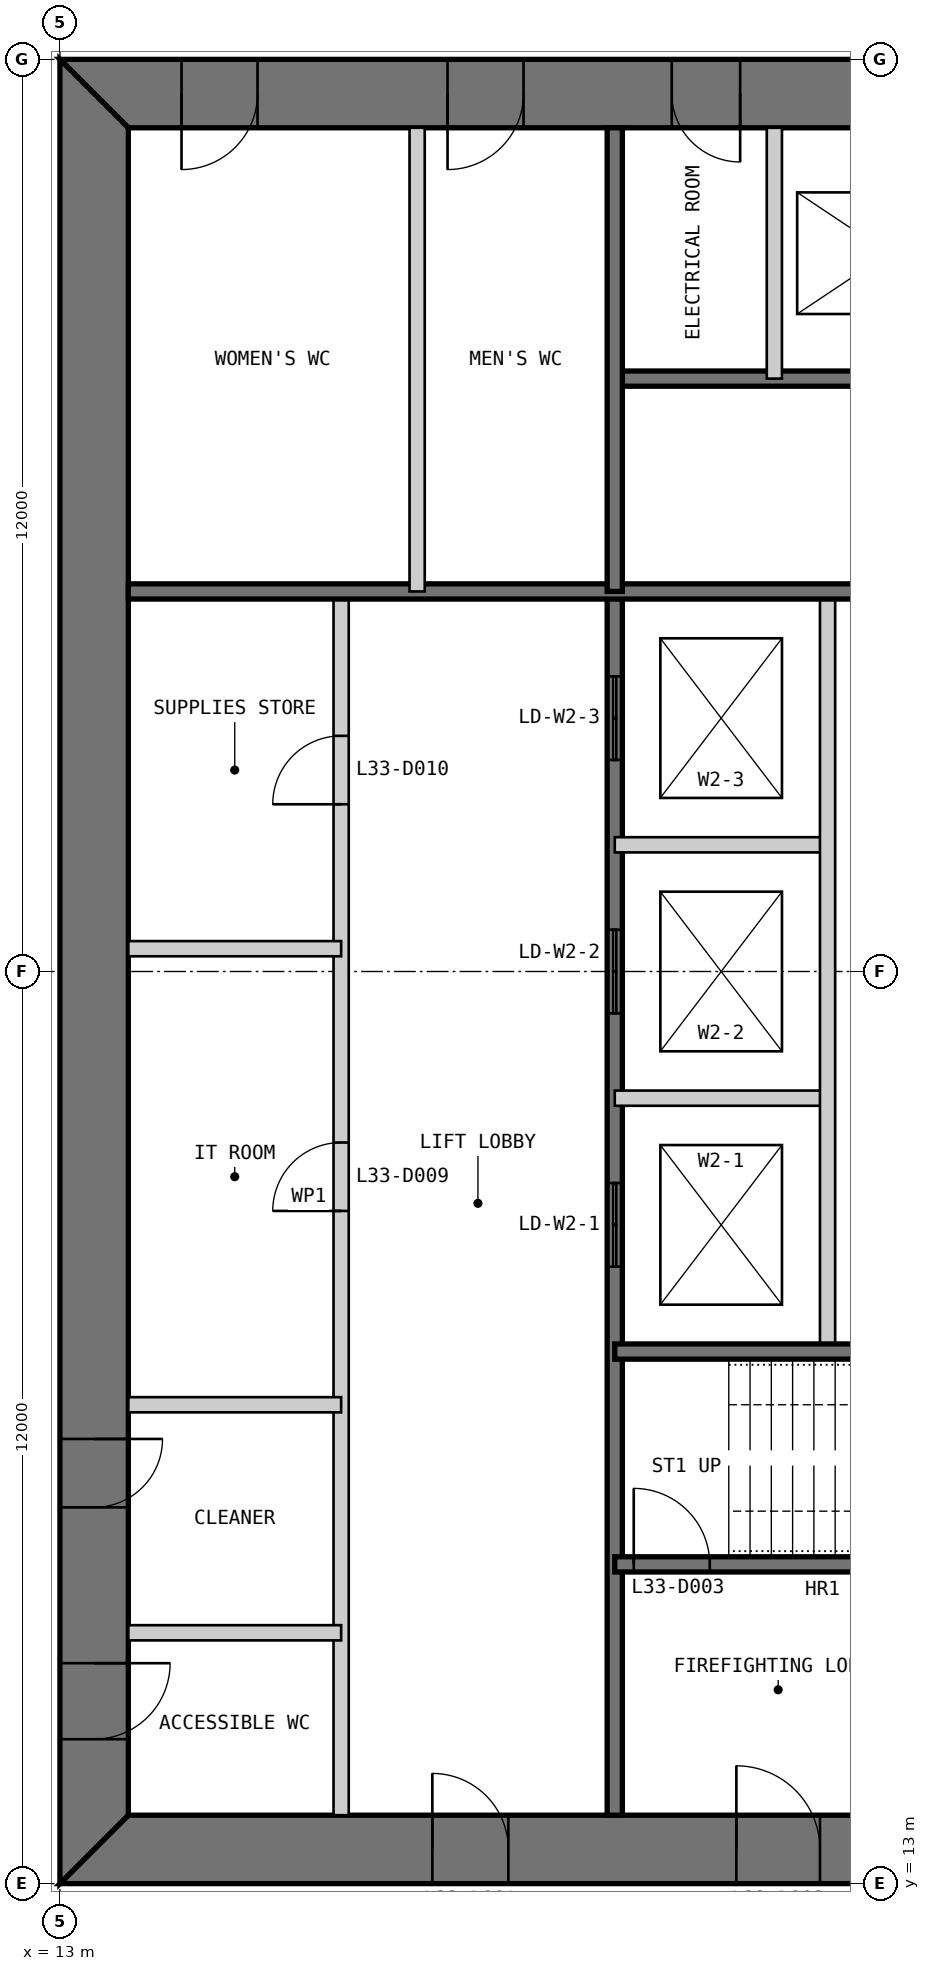
"""IFC4 building model, lengths in metres.
Left out: names, types, materials, properties, quantities, classifications, styles, units other than length and angle.
Written with IfcOpenShell. Run it as: python <this file> out.ifc"""

import sys

from ifc_helpers import new_model, si_unit, direction, frame, frame_2d, origin, place, context, subcontext, project, spatial, polyline, rectangle, outline, extrude, element, fill, save


model = new_model("IFC4")
c1 = context("Model", 3, precision=1e-05, world=origin(), true_north=direction((0.0, 1.0)))
c2 = subcontext(c1, "Body", "Model", "MODEL_VIEW")
j1 = project(units=[si_unit("LENGTHUNIT", "METRE"), si_unit("PLANEANGLEUNIT", "RADIAN")], contexts=[c1])
p1 = place(None, origin())
s1 = spatial("IfcSite", under=j1, at=p1, CompositionType="ELEMENT")
p2 = place(p1, origin())
s2 = spatial("IfcBuilding", under=s1, at=p2, CompositionType="ELEMENT")
p3 = place(p2, frame((0.0, 0.0, 142.4)))
s3 = spatial("IfcBuildingStorey", under=s2, at=p3, CompositionType="ELEMENT", Elevation=142.4)
p4 = place(p3, frame((13.0, 13.45, 0.0), z_axis=(0.0, 0.0, 1.0), x_axis=(1.0, 0.0, 0.0)))
e1 = element("IfcWall", 1, at=p4, inside=s3, PredefinedType="SHEAR", context=c2, shape_type="SweptSolid", body=[
    extrude(outline(polyline([(0.0, -0.45), (24.0, -0.45), (23.1, 0.45), (0.9, 0.45), (0.0, -0.45)])), origin(), (0.0, 0.0, 1.0), 4.0),
])
p5 = place(p4, frame((4.9, 0.0, 0.0)))
e2 = element("IfcOpeningElement", 2, at=p5, cuts=e1, PredefinedType="OPENING", context=c2, shape_type="SweptSolid", body=[
    extrude(rectangle(XDim=1.0, YDim=2.2, at=frame_2d((0.5, 1.1))), frame((0.0, 0.46, 0.0), z_axis=(0.0, -1.0, 0.0), x_axis=(1.0, 0.0, 0.0)), (0.0, 0.0, 1.0), 0.92),
])
p6 = place(p4, frame((8.9, 0.0, 0.0)))
e3 = element("IfcOpeningElement", 3, at=p6, cuts=e1, PredefinedType="OPENING", context=c2, shape_type="SweptSolid", body=[
    extrude(rectangle(XDim=1.1, YDim=2.2, at=frame_2d((0.55, 1.1))), frame((0.0, 0.46, 0.0), z_axis=(0.0, -1.0, 0.0), x_axis=(1.0, 0.0, 0.0)), (0.0, 0.0, 1.0), 0.92),
])
p7 = place(p4, frame((15.05, 0.0, 0.0)))
e4 = element("IfcOpeningElement", 4, at=p7, cuts=e1, PredefinedType="OPENING", context=c2, shape_type="SweptSolid", body=[
    extrude(rectangle(XDim=0.9, YDim=2.2, at=frame_2d((0.45, 1.1))), frame((0.0, 0.46, 0.0), z_axis=(0.0, -1.0, 0.0), x_axis=(1.0, 0.0, 0.0)), (0.0, 0.0, 1.0), 0.92),
])
p8 = place(p4, frame((17.9, 0.0, 0.0)))
e5 = element("IfcOpeningElement", 5, at=p8, cuts=e1, PredefinedType="OPENING", context=c2, shape_type="SweptSolid", body=[
    extrude(rectangle(XDim=1.0, YDim=2.2, at=frame_2d((0.5, 1.1))), frame((0.0, 0.46, 0.0), z_axis=(0.0, -1.0, 0.0), x_axis=(1.0, 0.0, 0.0)), (0.0, 0.0, 1.0), 0.92),
])
p9 = place(p4, frame((21.4, 0.0, 0.0)))
e6 = element("IfcOpeningElement", 6, at=p9, cuts=e1, PredefinedType="OPENING", context=c2, shape_type="SweptSolid", body=[
    extrude(rectangle(XDim=1.0, YDim=2.2, at=frame_2d((0.5, 1.1))), frame((0.0, 0.46, 0.0), z_axis=(0.0, -1.0, 0.0), x_axis=(1.0, 0.0, 0.0)), (0.0, 0.0, 1.0), 0.92),
])
p10 = place(p3, frame((37.0, 36.55, 0.0), z_axis=(0.0, 0.0, 1.0), x_axis=(-1.0, 0.0, 0.0)))
e7 = element("IfcWall", 7, at=p10, inside=s3, PredefinedType="SHEAR", context=c2, shape_type="SweptSolid", body=[
    extrude(outline(polyline([(0.0, -0.45), (24.0, -0.45), (23.1, 0.45), (0.9, 0.45), (0.0, -0.45)])), origin(), (0.0, 0.0, 1.0), 4.0),
])
p11 = place(p10, frame((4.9, 0.0, 0.0)))
e8 = element("IfcOpeningElement", 8, at=p11, cuts=e7, PredefinedType="OPENING", context=c2, shape_type="SweptSolid", body=[
    extrude(rectangle(XDim=1.0, YDim=2.2, at=frame_2d((0.5, 1.1))), frame((0.0, 0.46, 0.0), z_axis=(0.0, -1.0, 0.0), x_axis=(1.0, 0.0, 0.0)), (0.0, 0.0, 1.0), 0.92),
])
p12 = place(p10, frame((8.9, 0.0, 0.0)))
e9 = element("IfcOpeningElement", 9, at=p12, cuts=e7, PredefinedType="OPENING", context=c2, shape_type="SweptSolid", body=[
    extrude(rectangle(XDim=1.1, YDim=2.2, at=frame_2d((0.55, 1.1))), frame((0.0, 0.46, 0.0), z_axis=(0.0, -1.0, 0.0), x_axis=(1.0, 0.0, 0.0)), (0.0, 0.0, 1.0), 0.92),
])
p13 = place(p10, frame((15.05, 0.0, 0.0)))
e10 = element("IfcOpeningElement", 10, at=p13, cuts=e7, PredefinedType="OPENING", context=c2, shape_type="SweptSolid", body=[
    extrude(rectangle(XDim=0.9, YDim=2.2, at=frame_2d((0.45, 1.1))), frame((0.0, 0.46, 0.0), z_axis=(0.0, -1.0, 0.0), x_axis=(1.0, 0.0, 0.0)), (0.0, 0.0, 1.0), 0.92),
])
p14 = place(p10, frame((17.9, 0.0, 0.0)))
e11 = element("IfcOpeningElement", 11, at=p14, cuts=e7, PredefinedType="OPENING", context=c2, shape_type="SweptSolid", body=[
    extrude(rectangle(XDim=1.0, YDim=2.2, at=frame_2d((0.5, 1.1))), frame((0.0, 0.46, 0.0), z_axis=(0.0, -1.0, 0.0), x_axis=(1.0, 0.0, 0.0)), (0.0, 0.0, 1.0), 0.92),
])
p15 = place(p10, frame((21.4, 0.0, 0.0)))
e12 = element("IfcOpeningElement", 12, at=p15, cuts=e7, PredefinedType="OPENING", context=c2, shape_type="SweptSolid", body=[
    extrude(rectangle(XDim=1.0, YDim=2.2, at=frame_2d((0.5, 1.1))), frame((0.0, 0.46, 0.0), z_axis=(0.0, -1.0, 0.0), x_axis=(1.0, 0.0, 0.0)), (0.0, 0.0, 1.0), 0.92),
])
p16 = place(p3, frame((13.45, 36.1, 0.0), z_axis=(0.0, 0.0, 1.0), x_axis=(0.0, -1.0, 0.0)))
e13 = element("IfcWall", 13, at=p16, inside=s3, PredefinedType="SHEAR", context=c2, shape_type="SweptSolid", body=[
    extrude(outline(polyline([(-0.9, -0.45), (23.1, -0.45), (22.2, 0.45), (0.0, 0.45), (-0.9, -0.45)])), origin(), (0.0, 0.0, 1.0), 4.0),
])
p17 = place(p16, frame((20.2, 0.0, 0.0)))
e14 = element("IfcOpeningElement", 14, at=p17, cuts=e13, PredefinedType="OPENING", context=c2, shape_type="SweptSolid", body=[
    extrude(rectangle(XDim=1.0, YDim=2.2, at=frame_2d((0.5, 1.1))), frame((0.0, 0.46, 0.0), z_axis=(0.0, -1.0, 0.0), x_axis=(1.0, 0.0, 0.0)), (0.0, 0.0, 1.0), 0.92),
])
p18 = place(p16, frame((17.25, 0.0, 0.0)))
e15 = element("IfcOpeningElement", 15, at=p18, cuts=e13, PredefinedType="OPENING", context=c2, shape_type="SweptSolid", body=[
    extrude(rectangle(XDim=0.9, YDim=2.2, at=frame_2d((0.45, 1.1))), frame((0.0, 0.46, 0.0), z_axis=(0.0, -1.0, 0.0), x_axis=(1.0, 0.0, 0.0)), (0.0, 0.0, 1.0), 0.92),
])
p19 = place(p3, frame((16.7, 13.9, 0.0), z_axis=(0.0, 0.0, 1.0), x_axis=(0.0, 1.0, 0.0)))
e16 = element("IfcWall", 16, at=p19, inside=s3, PredefinedType="PARTITIONING", context=c2, shape_type="SweptSolid", body=[
    extrude(rectangle(XDim=16.1, YDim=0.2, at=frame_2d((8.05, 0.0))), origin(), (0.0, 0.0, 1.0), 3.8),
])
p20 = place(p19, frame((7.95, 0.0, 0.0)))
e17 = element("IfcOpeningElement", 17, at=p20, cuts=e16, PredefinedType="OPENING", context=c2, shape_type="SweptSolid", body=[
    extrude(rectangle(XDim=0.9, YDim=2.2, at=frame_2d((0.45, 1.1))), frame((0.0, 0.11, 0.0), z_axis=(0.0, -1.0, 0.0), x_axis=(1.0, 0.0, 0.0)), (0.0, 0.0, 1.0), 0.22),
])
p21 = place(p19, frame((13.3, 0.0, 0.0)))
e18 = element("IfcOpeningElement", 18, at=p21, cuts=e16, PredefinedType="OPENING", context=c2, shape_type="SweptSolid", body=[
    extrude(rectangle(XDim=0.9, YDim=2.2, at=frame_2d((0.45, 1.1))), frame((0.0, 0.11, 0.0), z_axis=(0.0, -1.0, 0.0), x_axis=(1.0, 0.0, 0.0)), (0.0, 0.0, 1.0), 0.22),
])
p22 = place(p3, frame((20.3, 13.9, 0.0), z_axis=(0.0, 0.0, 1.0), x_axis=(0.0, 1.0, 0.0)))
e19 = element("IfcWall", 19, at=p22, inside=s3, PredefinedType="SOLIDWALL", context=c2, shape_type="SweptSolid", body=[
    extrude(rectangle(XDim=16.1, YDim=0.2, at=frame_2d((8.05, 0.0))), origin(), (0.0, 0.0, 1.0), 3.8),
])
p23 = place(p22, frame((7.217, 0.0, 0.0)))
e20 = element("IfcOpeningElement", 20, at=p23, cuts=e19, PredefinedType="OPENING", context=c2, shape_type="SweptSolid", body=[
    extrude(rectangle(XDim=1.1, YDim=2.2, at=frame_2d((0.55, 1.1))), frame((0.0, 0.11, 0.0), z_axis=(0.0, -1.0, 0.0), x_axis=(1.0, 0.0, 0.0)), (0.0, 0.0, 1.0), 0.22),
])
p24 = place(p22, frame((10.55, 0.0, 0.0)))
e21 = element("IfcOpeningElement", 21, at=p24, cuts=e19, PredefinedType="OPENING", context=c2, shape_type="SweptSolid", body=[
    extrude(rectangle(XDim=1.1, YDim=2.2, at=frame_2d((0.55, 1.1))), frame((0.0, 0.11, 0.0), z_axis=(0.0, -1.0, 0.0), x_axis=(1.0, 0.0, 0.0)), (0.0, 0.0, 1.0), 0.22),
])
p25 = place(p22, frame((13.883, 0.0, 0.0)))
e22 = element("IfcOpeningElement", 22, at=p25, cuts=e19, PredefinedType="OPENING", context=c2, shape_type="SweptSolid", body=[
    extrude(rectangle(XDim=1.1, YDim=2.2, at=frame_2d((0.55, 1.1))), frame((0.0, 0.11, 0.0), z_axis=(0.0, -1.0, 0.0), x_axis=(1.0, 0.0, 0.0)), (0.0, 0.0, 1.0), 0.22),
])
for number, where, z_axis, x_axis in (
    (23, (20.3, 23.333, 0.0), (0.0, 0.0, 1.0), (1.0, 0.0, 0.0)),
    (24, (20.3, 26.667, 0.0), (0.0, 0.0, 1.0), (1.0, 0.0, 0.0)),
):
    element("IfcWall", number, at=place(p3, frame(where, z_axis=z_axis, x_axis=x_axis)), inside=s3, PredefinedType="PARTITIONING", context=c2, shape_type="SweptSolid", body=[
        extrude(rectangle(XDim=2.8, YDim=0.2, at=frame_2d((1.4, 0.0))), origin(), (0.0, 0.0, 1.0), 3.8),
    ])
p26 = place(p3, frame((23.1, 20.0, 0.0), z_axis=(0.0, 0.0, 1.0), x_axis=(0.0, 1.0, 0.0)))
e25 = element("IfcWall", 25, at=p26, inside=s3, PredefinedType="PARTITIONING", context=c2, shape_type="SweptSolid", body=[
    extrude(rectangle(XDim=10.0, YDim=0.2, at=frame_2d((5.0, 0.0))), origin(), (0.0, 0.0, 1.0), 3.8),
])
p27 = place(p3, frame((20.3, 17.2, 0.0), z_axis=(0.0, 0.0, 1.0), x_axis=(1.0, 0.0, 0.0)))
e26 = element("IfcWall", 26, at=p27, inside=s3, PredefinedType="SOLIDWALL", context=c2, shape_type="SweptSolid", body=[
    extrude(rectangle(XDim=9.4, YDim=0.2, at=frame_2d((4.7, 0.0))), origin(), (0.0, 0.0, 1.0), 3.8),
])
p28 = place(p27, frame((0.25, 0.0, 0.0)))
e27 = element("IfcOpeningElement", 27, at=p28, cuts=e26, PredefinedType="OPENING", context=c2, shape_type="SweptSolid", body=[
    extrude(rectangle(XDim=1.0, YDim=2.2, at=frame_2d((0.5, 1.1))), frame((0.0, 0.11, 0.0), z_axis=(0.0, -1.0, 0.0), x_axis=(1.0, 0.0, 0.0)), (0.0, 0.0, 1.0), 0.22),
])
p29 = place(p3, frame((20.3, 20.0, 0.0), z_axis=(0.0, 0.0, 1.0), x_axis=(1.0, 0.0, 0.0)))
e28 = element("IfcWall", 28, at=p29, inside=s3, PredefinedType="SOLIDWALL", context=c2, shape_type="SweptSolid", body=[
    extrude(rectangle(XDim=15.8, YDim=0.2, at=frame_2d((7.9, 0.0))), origin(), (0.0, 0.0, 1.0), 3.8),
])
for number, where, z_axis, x_axis in (
    (29, (13.9, 16.3, 0.0), (0.0, 0.0, 1.0), (1.0, 0.0, 0.0)),
    (30, (13.9, 19.3, 0.0), (0.0, 0.0, 1.0), (1.0, 0.0, 0.0)),
    (31, (13.9, 25.3, 0.0), (0.0, 0.0, 1.0), (1.0, 0.0, 0.0)),
):
    element("IfcWall", number, at=place(p3, frame(where, z_axis=z_axis, x_axis=x_axis)), inside=s3, PredefinedType="PARTITIONING", context=c2, shape_type="SweptSolid", body=[
        extrude(rectangle(XDim=2.8, YDim=0.2, at=frame_2d((1.4, 0.0))), origin(), (0.0, 0.0, 1.0), 3.8),
    ])
p30 = place(p3, frame((29.7, 32.8, 0.0), z_axis=(0.0, 0.0, 1.0), x_axis=(-1.0, 0.0, 0.0)))
e32 = element("IfcWall", 32, at=p30, inside=s3, PredefinedType="SOLIDWALL", context=c2, shape_type="SweptSolid", body=[
    extrude(rectangle(XDim=9.4, YDim=0.2, at=frame_2d((4.7, 0.0))), origin(), (0.0, 0.0, 1.0), 3.8),
])
p31 = place(p30, frame((0.25, 0.0, 0.0)))
e33 = element("IfcOpeningElement", 33, at=p31, cuts=e32, PredefinedType="OPENING", context=c2, shape_type="SweptSolid", body=[
    extrude(rectangle(XDim=1.0, YDim=2.2, at=frame_2d((0.5, 1.1))), frame((0.0, 0.11, 0.0), z_axis=(0.0, -1.0, 0.0), x_axis=(1.0, 0.0, 0.0)), (0.0, 0.0, 1.0), 0.22),
])
p32 = place(p3, frame((29.7, 30.0, 0.0), z_axis=(0.0, 0.0, 1.0), x_axis=(-1.0, 0.0, 0.0)))
e34 = element("IfcWall", 34, at=p32, inside=s3, PredefinedType="SOLIDWALL", context=c2, shape_type="SweptSolid", body=[
    extrude(rectangle(XDim=15.8, YDim=0.2, at=frame_2d((7.9, 0.0))), origin(), (0.0, 0.0, 1.0), 3.8),
])
p33 = place(p3, frame((22.4, 36.1, 0.0), z_axis=(0.0, 0.0, 1.0), x_axis=(0.0, -1.0, 0.0)))
e35 = element("IfcWall", 35, at=p33, inside=s3, PredefinedType="PARTITIONING", context=c2, shape_type="SweptSolid", body=[
    extrude(rectangle(XDim=3.3, YDim=0.2, at=frame_2d((1.65, 0.0))), origin(), (0.0, 0.0, 1.0), 3.8),
])
p34 = place(p3, frame((20.3, 36.1, 0.0), z_axis=(0.0, 0.0, 1.0), x_axis=(0.0, -1.0, 0.0)))
e36 = element("IfcWall", 36, at=p34, inside=s3, PredefinedType="SOLIDWALL", context=c2, shape_type="SweptSolid", body=[
    extrude(rectangle(XDim=6.1, YDim=0.2, at=frame_2d((3.05, 0.0))), origin(), (0.0, 0.0, 1.0), 3.8),
])
p35 = place(p3, frame((17.7, 36.1, 0.0), z_axis=(0.0, 0.0, 1.0), x_axis=(0.0, -1.0, 0.0)))
e37 = element("IfcWall", 37, at=p35, inside=s3, PredefinedType="PARTITIONING", context=c2, shape_type="SweptSolid", body=[
    extrude(rectangle(XDim=6.1, YDim=0.2, at=frame_2d((3.05, 0.0))), origin(), (0.0, 0.0, 1.0), 3.8),
])
p36 = place(p5, origin())
e38 = element("IfcDoor", 38, at=p36, inside=s3, OperationType="SINGLE_SWING_LEFT", PredefinedType="DOOR", context=c2, shape_type="SweptSolid", body=[
    extrude(rectangle(XDim=1.0, YDim=2.2, at=frame_2d((0.5, 1.1))), frame((0.0, 0.025, 0.0), z_axis=(0.0, -1.0, 0.0), x_axis=(1.0, 0.0, 0.0)), (0.0, 0.0, 1.0), 0.05),
    extrude(outline(polyline([(0.0, 0.0), (0.04, 0.0), (0.04, 2.16), (0.96, 2.16), (0.96, 0.0), (1.0, 0.0), (1.0, 2.2), (0.0, 2.2), (0.0, 0.0)])), frame((0.0, 0.3, 0.0), z_axis=(0.0, -1.0, 0.0), x_axis=(1.0, 0.0, 0.0)), (0.0, 0.0, 1.0), 0.6),
])
fill(e2, e38)
p37 = place(p6, origin())
e39 = element("IfcDoor", 39, at=p37, inside=s3, OperationType="SINGLE_SWING_LEFT", PredefinedType="DOOR", context=c2, shape_type="SweptSolid", body=[
    extrude(rectangle(XDim=1.1, YDim=2.2, at=frame_2d((0.55, 1.1))), frame((0.0, 0.025, 0.0), z_axis=(0.0, -1.0, 0.0), x_axis=(1.0, 0.0, 0.0)), (0.0, 0.0, 1.0), 0.05),
    extrude(outline(polyline([(0.0, 0.0), (0.04, 0.0), (0.04, 2.16), (1.06, 2.16), (1.06, 0.0), (1.1, 0.0), (1.1, 2.2), (0.0, 2.2), (0.0, 0.0)])), frame((0.0, 0.3, 0.0), z_axis=(0.0, -1.0, 0.0), x_axis=(1.0, 0.0, 0.0)), (0.0, 0.0, 1.0), 0.6),
])
fill(e3, e39)
p38 = place(p28, origin())
e40 = element("IfcDoor", 40, at=p38, inside=s3, OperationType="SINGLE_SWING_LEFT", PredefinedType="DOOR", context=c2, shape_type="SweptSolid", body=[
    extrude(rectangle(XDim=1.0, YDim=2.2, at=frame_2d((0.5, 1.1))), frame((0.0, 0.025, 0.0), z_axis=(0.0, -1.0, 0.0), x_axis=(1.0, 0.0, 0.0)), (0.0, 0.0, 1.0), 0.05),
])
fill(e27, e40)
p39 = place(p17, origin())
e41 = element("IfcDoor", 41, at=p39, inside=s3, OperationType="SINGLE_SWING_LEFT", PredefinedType="DOOR", context=c2, shape_type="SweptSolid", body=[
    extrude(rectangle(XDim=1.0, YDim=2.2, at=frame_2d((0.5, 1.1))), frame((0.0, 0.025, 0.0), z_axis=(0.0, -1.0, 0.0), x_axis=(1.0, 0.0, 0.0)), (0.0, 0.0, 1.0), 0.05),
    extrude(outline(polyline([(0.0, 0.0), (0.04, 0.0), (0.04, 2.16), (0.96, 2.16), (0.96, 0.0), (1.0, 0.0), (1.0, 2.2), (0.0, 2.2), (0.0, 0.0)])), frame((0.0, 0.3, 0.0), z_axis=(0.0, -1.0, 0.0), x_axis=(1.0, 0.0, 0.0)), (0.0, 0.0, 1.0), 0.6),
])
fill(e14, e41)
p40 = place(p18, origin())
e42 = element("IfcDoor", 42, at=p40, inside=s3, OperationType="SINGLE_SWING_LEFT", PredefinedType="DOOR", context=c2, shape_type="SweptSolid", body=[
    extrude(rectangle(XDim=0.9, YDim=2.2, at=frame_2d((0.45, 1.1))), frame((0.0, 0.025, 0.0), z_axis=(0.0, -1.0, 0.0), x_axis=(1.0, 0.0, 0.0)), (0.0, 0.0, 1.0), 0.05),
    extrude(outline(polyline([(0.0, 0.0), (0.04, 0.0), (0.04, 2.16), (0.86, 2.16), (0.86, 0.0), (0.9, 0.0), (0.9, 2.2), (0.0, 2.2), (0.0, 0.0)])), frame((0.0, 0.3, 0.0), z_axis=(0.0, -1.0, 0.0), x_axis=(1.0, 0.0, 0.0)), (0.0, 0.0, 1.0), 0.6),
])
fill(e15, e42)
p41 = place(p20, origin())
e43 = element("IfcDoor", 43, at=p41, inside=s3, OperationType="SINGLE_SWING_LEFT", PredefinedType="DOOR", context=c2, shape_type="SweptSolid", body=[
    extrude(rectangle(XDim=0.9, YDim=2.2, at=frame_2d((0.45, 1.1))), frame((0.0, 0.025, 0.0), z_axis=(0.0, -1.0, 0.0), x_axis=(1.0, 0.0, 0.0)), (0.0, 0.0, 1.0), 0.05),
])
fill(e17, e43)
p42 = place(p21, origin())
e44 = element("IfcDoor", 44, at=p42, inside=s3, OperationType="SINGLE_SWING_LEFT", PredefinedType="DOOR", context=c2, shape_type="SweptSolid", body=[
    extrude(rectangle(XDim=0.9, YDim=2.2, at=frame_2d((0.45, 1.1))), frame((0.0, 0.025, 0.0), z_axis=(0.0, -1.0, 0.0), x_axis=(1.0, 0.0, 0.0)), (0.0, 0.0, 1.0), 0.05),
])
fill(e18, e44)
p43 = place(p13, origin())
e45 = element("IfcDoor", 45, at=p43, inside=s3, OperationType="SINGLE_SWING_LEFT", PredefinedType="DOOR", context=c2, shape_type="SweptSolid", body=[
    extrude(rectangle(XDim=0.9, YDim=2.2, at=frame_2d((0.45, 1.1))), frame((0.0, 0.025, 0.0), z_axis=(0.0, -1.0, 0.0), x_axis=(1.0, 0.0, 0.0)), (0.0, 0.0, 1.0), 0.05),
    extrude(outline(polyline([(0.0, 0.0), (0.04, 0.0), (0.04, 2.16), (0.86, 2.16), (0.86, 0.0), (0.9, 0.0), (0.9, 2.2), (0.0, 2.2), (0.0, 0.0)])), frame((0.0, 0.3, 0.0), z_axis=(0.0, -1.0, 0.0), x_axis=(1.0, 0.0, 0.0)), (0.0, 0.0, 1.0), 0.6),
])
fill(e10, e45)
p44 = place(p14, origin())
e46 = element("IfcDoor", 46, at=p44, inside=s3, OperationType="SINGLE_SWING_RIGHT", PredefinedType="DOOR", context=c2, shape_type="SweptSolid", body=[
    extrude(rectangle(XDim=1.0, YDim=2.2, at=frame_2d((0.5, 1.1))), frame((0.0, 0.025, 0.0), z_axis=(0.0, -1.0, 0.0), x_axis=(1.0, 0.0, 0.0)), (0.0, 0.0, 1.0), 0.05),
    extrude(outline(polyline([(0.0, 0.0), (0.04, 0.0), (0.04, 2.16), (0.96, 2.16), (0.96, 0.0), (1.0, 0.0), (1.0, 2.2), (0.0, 2.2), (0.0, 0.0)])), frame((0.0, 0.3, 0.0), z_axis=(0.0, -1.0, 0.0), x_axis=(1.0, 0.0, 0.0)), (0.0, 0.0, 1.0), 0.6),
])
fill(e11, e46)
p45 = place(p15, origin())
e47 = element("IfcDoor", 47, at=p45, inside=s3, OperationType="SINGLE_SWING_RIGHT", PredefinedType="DOOR", context=c2, shape_type="SweptSolid", body=[
    extrude(rectangle(XDim=1.0, YDim=2.2, at=frame_2d((0.5, 1.1))), frame((0.0, 0.025, 0.0), z_axis=(0.0, -1.0, 0.0), x_axis=(1.0, 0.0, 0.0)), (0.0, 0.0, 1.0), 0.05),
    extrude(outline(polyline([(0.0, 0.0), (0.04, 0.0), (0.04, 2.16), (0.96, 2.16), (0.96, 0.0), (1.0, 0.0), (1.0, 2.2), (0.0, 2.2), (0.0, 0.0)])), frame((0.0, 0.3, 0.0), z_axis=(0.0, -1.0, 0.0), x_axis=(1.0, 0.0, 0.0)), (0.0, 0.0, 1.0), 0.6),
])
fill(e12, e47)
p46 = place(p23, origin())
e48 = element("IfcDoor", 48, at=p46, inside=s3, OperationType="DOUBLE_DOOR_SLIDING", PredefinedType="DOOR", context=c2, shape_type="SweptSolid", body=[
    extrude(rectangle(XDim=1.1, YDim=2.2, at=frame_2d((0.55, 1.1))), frame((0.0, 0.025, 0.0), z_axis=(0.0, -1.0, 0.0), x_axis=(1.0, 0.0, 0.0)), (0.0, 0.0, 1.0), 0.05),
])
fill(e20, e48)
p47 = place(p24, origin())
e49 = element("IfcDoor", 49, at=p47, inside=s3, OperationType="DOUBLE_DOOR_SLIDING", PredefinedType="DOOR", context=c2, shape_type="SweptSolid", body=[
    extrude(rectangle(XDim=1.1, YDim=2.2, at=frame_2d((0.55, 1.1))), frame((0.0, 0.025, 0.0), z_axis=(0.0, -1.0, 0.0), x_axis=(1.0, 0.0, 0.0)), (0.0, 0.0, 1.0), 0.05),
])
fill(e21, e49)
p48 = place(p25, origin())
e50 = element("IfcDoor", 50, at=p48, inside=s3, OperationType="DOUBLE_DOOR_SLIDING", PredefinedType="DOOR", context=c2, shape_type="SweptSolid", body=[
    extrude(rectangle(XDim=1.1, YDim=2.2, at=frame_2d((0.55, 1.1))), frame((0.0, 0.025, 0.0), z_axis=(0.0, -1.0, 0.0), x_axis=(1.0, 0.0, 0.0)), (0.0, 0.0, 1.0), 0.05),
])
fill(e22, e50)
save(model, sys.argv[1])
